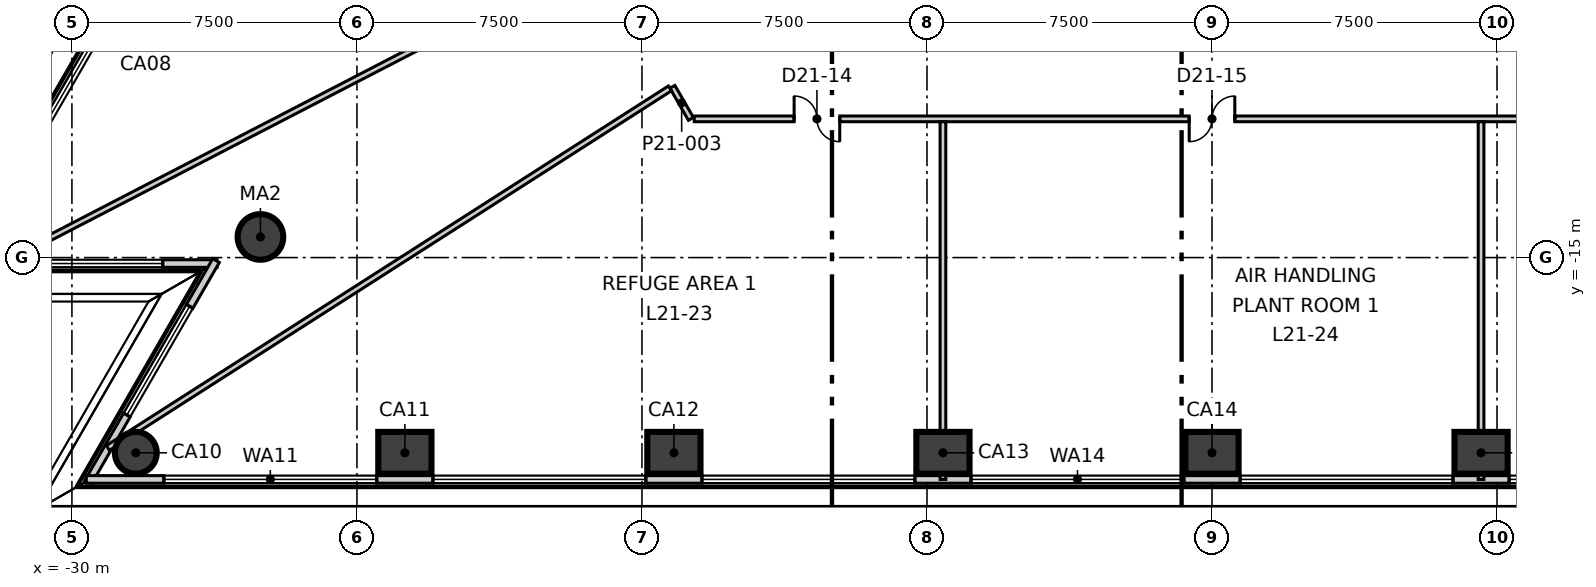
"""IFC4 building model, lengths in metres.
Left out: names, types, materials, properties, quantities, classifications, styles, units other than length and angle.
Written with IfcOpenShell. Run it as: python <this file> out.ifc"""

import sys

from ifc_helpers import new_model, si_unit, direction, frame, frame_2d, origin, origin_2d, place, context, subcontext, project, spatial, rectangle, circle, extrude, element, fill, save


model = new_model("IFC4")
c1 = context("Model", 3, precision=1e-05, world=origin(), true_north=direction((0.0, 1.0)))
c2 = subcontext(c1, "Body", "Model", "MODEL_VIEW")
j1 = project(units=[si_unit("LENGTHUNIT", "METRE"), si_unit("PLANEANGLEUNIT", "RADIAN")], contexts=[c1])
p1 = place(None, origin())
s1 = spatial("IfcSite", under=j1, at=p1, CompositionType="ELEMENT")
p2 = place(p1, origin())
s2 = spatial("IfcBuilding", under=s1, at=p2, CompositionType="ELEMENT")
p3 = place(p2, frame((0.0, 0.0, 95.3)))
s3 = spatial("IfcBuildingStorey", under=s2, at=p3, CompositionType="ELEMENT", Elevation=95.3)
p4 = place(p3, frame((-28.319, -20.137, -0.3), z_axis=(0.0, 0.0, 1.0), x_axis=(1.0, 0.0, 0.0)))
e1 = element("IfcColumn", 1, at=p4, inside=s3, PredefinedType="COLUMN", context=c2, shape_type="SweptSolid", body=[
    extrude(circle(Radius=0.55, at=origin_2d()), origin(), (0.0, 0.0, 1.0), 4.2),
])
for number, where, z_axis, x_axis in (
    (2, (-21.239, -20.137, -0.3), (0.0, 0.0, 1.0), (1.0, 0.0, 0.0)),
    (3, (-14.16, -20.137, -0.3), (0.0, 0.0, 1.0), (1.0, 0.0, 0.0)),
    (4, (-7.08, -20.137, -0.3), (0.0, 0.0, 1.0), (1.0, 0.0, 0.0)),
    (5, (0.0, -20.137, -0.3), (0.0, 0.0, 1.0), (1.0, 0.0, 0.0)),
    (6, (7.08, -20.137, -0.3), (0.0, 0.0, 1.0), (1.0, 0.0, 0.0)),
):
    element("IfcColumn", number, at=place(p3, frame(where, z_axis=z_axis, x_axis=x_axis)), inside=s3, PredefinedType="COLUMN", context=c2, shape_type="SweptSolid", body=[
        extrude(rectangle(XDim=1.4, YDim=1.1, at=origin_2d()), origin(), (0.0, 0.0, 1.0), 4.2),
    ])
p5 = place(p3, frame((-25.04, -14.457, -0.3), z_axis=(0.0, 0.0, 1.0), x_axis=(1.0, 0.0, 0.0)))
e7 = element("IfcColumn", 7, at=p5, inside=s3, PredefinedType="COLUMN", context=c2, shape_type="SweptSolid", body=[
    extrude(circle(Radius=0.6, at=origin_2d()), origin(), (0.0, 0.0, 1.0), 4.2),
])
p6 = place(p3, frame((-3.234, 36.072, 0.0), z_axis=(0.0, 0.0, 1.0), x_axis=(-0.500009108245, -0.866020145073, 0.0)))
e8 = element("IfcWall", 8, at=p6, inside=s3, PredefinedType="ELEMENTEDWALL", context=c2, shape_type="SweptSolid", body=[
    extrude(rectangle(XDim=59.225, YDim=0.2, at=frame_2d((29.613, 0.0))), origin(), (0.0, 0.0, 1.0), 3.9),
])
p7 = place(p6, frame((2.042, 0.0, 0.9)))
e9 = element("IfcOpeningElement", 9, at=p7, cuts=e8, PredefinedType="OPENING", context=c2, shape_type="SweptSolid", body=[
    extrude(rectangle(XDim=5.6, YDim=2.5, at=frame_2d((2.8, 1.25))), frame((0.0, 0.11, 0.0), z_axis=(0.0, -1.0, 0.0), x_axis=(1.0, 0.0, 0.0)), (0.0, 0.0, 1.0), 0.22),
])
p8 = place(p6, frame((9.122, 0.0, 0.9)))
e10 = element("IfcOpeningElement", 10, at=p8, cuts=e8, PredefinedType="OPENING", context=c2, shape_type="SweptSolid", body=[
    extrude(rectangle(XDim=5.6, YDim=2.5, at=frame_2d((2.8, 1.25))), frame((0.0, 0.11, 0.0), z_axis=(0.0, -1.0, 0.0), x_axis=(1.0, 0.0, 0.0)), (0.0, 0.0, 1.0), 0.22),
])
p9 = place(p6, frame((16.202, 0.0, 0.9)))
e11 = element("IfcOpeningElement", 11, at=p9, cuts=e8, PredefinedType="OPENING", context=c2, shape_type="SweptSolid", body=[
    extrude(rectangle(XDim=5.6, YDim=2.5, at=frame_2d((2.8, 1.25))), frame((0.0, 0.11, 0.0), z_axis=(0.0, -1.0, 0.0), x_axis=(1.0, 0.0, 0.0)), (0.0, 0.0, 1.0), 0.22),
])
p10 = place(p6, frame((23.282, 0.0, 0.9)))
e12 = element("IfcOpeningElement", 12, at=p10, cuts=e8, PredefinedType="OPENING", context=c2, shape_type="SweptSolid", body=[
    extrude(rectangle(XDim=5.6, YDim=2.5, at=frame_2d((2.8, 1.25))), frame((0.0, 0.11, 0.0), z_axis=(0.0, -1.0, 0.0), x_axis=(1.0, 0.0, 0.0)), (0.0, 0.0, 1.0), 0.22),
])
p11 = place(p6, frame((30.362, 0.0, 0.9)))
e13 = element("IfcOpeningElement", 13, at=p11, cuts=e8, PredefinedType="OPENING", context=c2, shape_type="SweptSolid", body=[
    extrude(rectangle(XDim=5.6, YDim=2.5, at=frame_2d((2.8, 1.25))), frame((0.0, 0.11, 0.0), z_axis=(0.0, -1.0, 0.0), x_axis=(1.0, 0.0, 0.0)), (0.0, 0.0, 1.0), 0.22),
])
p12 = place(p6, frame((37.442, 0.0, 0.9)))
e14 = element("IfcOpeningElement", 14, at=p12, cuts=e8, PredefinedType="OPENING", context=c2, shape_type="SweptSolid", body=[
    extrude(rectangle(XDim=5.6, YDim=2.5, at=frame_2d((2.8, 1.25))), frame((0.0, 0.11, 0.0), z_axis=(0.0, -1.0, 0.0), x_axis=(1.0, 0.0, 0.0)), (0.0, 0.0, 1.0), 0.22),
])
p13 = place(p6, frame((44.522, 0.0, 0.9)))
e15 = element("IfcOpeningElement", 15, at=p13, cuts=e8, PredefinedType="OPENING", context=c2, shape_type="SweptSolid", body=[
    extrude(rectangle(XDim=5.6, YDim=2.5, at=frame_2d((2.8, 1.25))), frame((0.0, 0.11, 0.0), z_axis=(0.0, -1.0, 0.0), x_axis=(1.0, 0.0, 0.0)), (0.0, 0.0, 1.0), 0.22),
])
p14 = place(p6, frame((51.602, 0.0, 0.9)))
e16 = element("IfcOpeningElement", 16, at=p14, cuts=e8, PredefinedType="OPENING", context=c2, shape_type="SweptSolid", body=[
    extrude(rectangle(XDim=5.6, YDim=2.5, at=frame_2d((2.8, 1.25))), frame((0.0, 0.11, 0.0), z_axis=(0.0, -1.0, 0.0), x_axis=(1.0, 0.0, 0.0)), (0.0, 0.0, 1.0), 0.22),
])
p15 = place(p3, frame((-32.902, -15.157, 0.0), z_axis=(0.0, 0.0, 1.0), x_axis=(1.0, 0.0, 0.0)))
e17 = element("IfcWall", 17, at=p15, inside=s3, PredefinedType="ELEMENTEDWALL", context=c2, shape_type="SweptSolid", body=[
    extrude(rectangle(XDim=6.719, YDim=0.2, at=frame_2d((3.359, 0.0))), origin(), (0.0, 0.0, 1.0), 3.9),
])
p16 = place(p15, frame((1.99, 0.0, 0.9)))
e18 = element("IfcOpeningElement", 18, at=p16, cuts=e17, PredefinedType="OPENING", context=c2, shape_type="SweptSolid", body=[
    extrude(rectangle(XDim=3.3, YDim=2.5, at=frame_2d((1.65, 1.25))), frame((0.0, 0.11, 0.0), z_axis=(0.0, -1.0, 0.0), x_axis=(1.0, 0.0, 0.0)), (0.0, 0.0, 1.0), 0.22),
])
p17 = place(p3, frame((-26.208, -15.079, 0.0), z_axis=(0.0, 0.0, 1.0), x_axis=(-0.49993005842, -0.866065780809, 0.0)))
e19 = element("IfcWall", 19, at=p17, inside=s3, PredefinedType="ELEMENTEDWALL", context=c2, shape_type="SweptSolid", body=[
    extrude(rectangle(XDim=6.719, YDim=0.2, at=frame_2d((3.359, 0.0))), origin(), (0.0, 0.0, 1.0), 3.9),
])
p18 = place(p17, frame((1.39, 0.0, 0.9)))
e20 = element("IfcOpeningElement", 20, at=p18, cuts=e19, PredefinedType="OPENING", context=c2, shape_type="SweptSolid", body=[
    extrude(rectangle(XDim=3.3, YDim=2.5, at=frame_2d((1.65, 1.25))), frame((0.0, 0.11, 0.0), z_axis=(0.0, -1.0, 0.0), x_axis=(1.0, 0.0, 0.0)), (0.0, 0.0, 1.0), 0.22),
])
p19 = place(p3, frame((-29.622, -20.837, 0.0), z_axis=(0.0, 0.0, 1.0), x_axis=(1.0, 0.0, 0.0)))
e21 = element("IfcWall", 21, at=p19, inside=s3, PredefinedType="ELEMENTEDWALL", context=c2, shape_type="SweptSolid", body=[
    extrude(rectangle(XDim=59.224, YDim=0.2, at=frame_2d((29.612, 0.0))), origin(), (0.0, 0.0, 1.0), 3.9),
])
p20 = place(p19, frame((2.043, 0.0, 0.9)))
e22 = element("IfcOpeningElement", 22, at=p20, cuts=e21, PredefinedType="OPENING", context=c2, shape_type="SweptSolid", body=[
    extrude(rectangle(XDim=5.6, YDim=2.5, at=frame_2d((2.8, 1.25))), frame((0.0, 0.11, 0.0), z_axis=(0.0, -1.0, 0.0), x_axis=(1.0, 0.0, 0.0)), (0.0, 0.0, 1.0), 0.22),
])
p21 = place(p19, frame((9.123, 0.0, 0.9)))
e23 = element("IfcOpeningElement", 23, at=p21, cuts=e21, PredefinedType="OPENING", context=c2, shape_type="SweptSolid", body=[
    extrude(rectangle(XDim=5.6, YDim=2.5, at=frame_2d((2.8, 1.25))), frame((0.0, 0.11, 0.0), z_axis=(0.0, -1.0, 0.0), x_axis=(1.0, 0.0, 0.0)), (0.0, 0.0, 1.0), 0.22),
])
p22 = place(p19, frame((16.202, 0.0, 0.9)))
e24 = element("IfcOpeningElement", 24, at=p22, cuts=e21, PredefinedType="OPENING", context=c2, shape_type="SweptSolid", body=[
    extrude(rectangle(XDim=5.6, YDim=2.5, at=frame_2d((2.8, 1.25))), frame((0.0, 0.11, 0.0), z_axis=(0.0, -1.0, 0.0), x_axis=(1.0, 0.0, 0.0)), (0.0, 0.0, 1.0), 0.22),
])
p23 = place(p19, frame((23.282, 0.0, 0.9)))
e25 = element("IfcOpeningElement", 25, at=p23, cuts=e21, PredefinedType="OPENING", context=c2, shape_type="SweptSolid", body=[
    extrude(rectangle(XDim=5.6, YDim=2.5, at=frame_2d((2.8, 1.25))), frame((0.0, 0.11, 0.0), z_axis=(0.0, -1.0, 0.0), x_axis=(1.0, 0.0, 0.0)), (0.0, 0.0, 1.0), 0.22),
])
p24 = place(p19, frame((30.362, 0.0, 0.9)))
e26 = element("IfcOpeningElement", 26, at=p24, cuts=e21, PredefinedType="OPENING", context=c2, shape_type="SweptSolid", body=[
    extrude(rectangle(XDim=5.6, YDim=2.5, at=frame_2d((2.8, 1.25))), frame((0.0, 0.11, 0.0), z_axis=(0.0, -1.0, 0.0), x_axis=(1.0, 0.0, 0.0)), (0.0, 0.0, 1.0), 0.22),
])
p25 = place(p19, frame((37.442, 0.0, 0.9)))
e27 = element("IfcOpeningElement", 27, at=p25, cuts=e21, PredefinedType="OPENING", context=c2, shape_type="SweptSolid", body=[
    extrude(rectangle(XDim=5.6, YDim=2.5, at=frame_2d((2.8, 1.25))), frame((0.0, 0.11, 0.0), z_axis=(0.0, -1.0, 0.0), x_axis=(1.0, 0.0, 0.0)), (0.0, 0.0, 1.0), 0.22),
])
p26 = place(p19, frame((44.521, 0.0, 0.9)))
e28 = element("IfcOpeningElement", 28, at=p26, cuts=e21, PredefinedType="OPENING", context=c2, shape_type="SweptSolid", body=[
    extrude(rectangle(XDim=5.6, YDim=2.5, at=frame_2d((2.8, 1.25))), frame((0.0, 0.11, 0.0), z_axis=(0.0, -1.0, 0.0), x_axis=(1.0, 0.0, 0.0)), (0.0, 0.0, 1.0), 0.22),
])
p27 = place(p19, frame((51.601, 0.0, 0.9)))
e29 = element("IfcOpeningElement", 29, at=p27, cuts=e21, PredefinedType="OPENING", context=c2, shape_type="SweptSolid", body=[
    extrude(rectangle(XDim=5.6, YDim=2.5, at=frame_2d((2.8, 1.25))), frame((0.0, 0.11, 0.0), z_axis=(0.0, -1.0, 0.0), x_axis=(1.0, 0.0, 0.0)), (0.0, 0.0, 1.0), 0.22),
])
p28 = place(p3, frame((32.857, -15.235, 0.0), z_axis=(0.0, 0.0, 1.0), x_axis=(-0.500009108245, 0.866020145073, 0.0)))
e30 = element("IfcWall", 30, at=p28, inside=s3, PredefinedType="ELEMENTEDWALL", context=c2, shape_type="SweptSolid", body=[
    extrude(rectangle(XDim=59.225, YDim=0.2, at=frame_2d((29.613, 0.0))), origin(), (0.0, 0.0, 1.0), 3.9),
])
p29 = place(p28, frame((2.043, 0.0, 0.9)))
e31 = element("IfcOpeningElement", 31, at=p29, cuts=e30, PredefinedType="OPENING", context=c2, shape_type="SweptSolid", body=[
    extrude(rectangle(XDim=5.6, YDim=2.5, at=frame_2d((2.8, 1.25))), frame((0.0, 0.11, 0.0), z_axis=(0.0, -1.0, 0.0), x_axis=(1.0, 0.0, 0.0)), (0.0, 0.0, 1.0), 0.22),
])
p30 = place(p28, frame((9.123, 0.0, 0.9)))
e32 = element("IfcOpeningElement", 32, at=p30, cuts=e30, PredefinedType="OPENING", context=c2, shape_type="SweptSolid", body=[
    extrude(rectangle(XDim=5.6, YDim=2.5, at=frame_2d((2.8, 1.25))), frame((0.0, 0.11, 0.0), z_axis=(0.0, -1.0, 0.0), x_axis=(1.0, 0.0, 0.0)), (0.0, 0.0, 1.0), 0.22),
])
p31 = place(p28, frame((16.203, 0.0, 0.9)))
e33 = element("IfcOpeningElement", 33, at=p31, cuts=e30, PredefinedType="OPENING", context=c2, shape_type="SweptSolid", body=[
    extrude(rectangle(XDim=5.6, YDim=2.5, at=frame_2d((2.8, 1.25))), frame((0.0, 0.11, 0.0), z_axis=(0.0, -1.0, 0.0), x_axis=(1.0, 0.0, 0.0)), (0.0, 0.0, 1.0), 0.22),
])
p32 = place(p28, frame((23.282, 0.0, 0.9)))
e34 = element("IfcOpeningElement", 34, at=p32, cuts=e30, PredefinedType="OPENING", context=c2, shape_type="SweptSolid", body=[
    extrude(rectangle(XDim=5.6, YDim=2.5, at=frame_2d((2.8, 1.25))), frame((0.0, 0.11, 0.0), z_axis=(0.0, -1.0, 0.0), x_axis=(1.0, 0.0, 0.0)), (0.0, 0.0, 1.0), 0.22),
])
p33 = place(p28, frame((30.362, 0.0, 0.9)))
e35 = element("IfcOpeningElement", 35, at=p33, cuts=e30, PredefinedType="OPENING", context=c2, shape_type="SweptSolid", body=[
    extrude(rectangle(XDim=5.6, YDim=2.5, at=frame_2d((2.8, 1.25))), frame((0.0, 0.11, 0.0), z_axis=(0.0, -1.0, 0.0), x_axis=(1.0, 0.0, 0.0)), (0.0, 0.0, 1.0), 0.22),
])
p34 = place(p28, frame((37.442, 0.0, 0.9)))
e36 = element("IfcOpeningElement", 36, at=p34, cuts=e30, PredefinedType="OPENING", context=c2, shape_type="SweptSolid", body=[
    extrude(rectangle(XDim=5.6, YDim=2.5, at=frame_2d((2.8, 1.25))), frame((0.0, 0.11, 0.0), z_axis=(0.0, -1.0, 0.0), x_axis=(1.0, 0.0, 0.0)), (0.0, 0.0, 1.0), 0.22),
])
p35 = place(p28, frame((44.522, 0.0, 0.9)))
e37 = element("IfcOpeningElement", 37, at=p35, cuts=e30, PredefinedType="OPENING", context=c2, shape_type="SweptSolid", body=[
    extrude(rectangle(XDim=5.6, YDim=2.5, at=frame_2d((2.8, 1.25))), frame((0.0, 0.11, 0.0), z_axis=(0.0, -1.0, 0.0), x_axis=(1.0, 0.0, 0.0)), (0.0, 0.0, 1.0), 0.22),
])
p36 = place(p28, frame((51.602, 0.0, 0.9)))
e38 = element("IfcOpeningElement", 38, at=p36, cuts=e30, PredefinedType="OPENING", context=c2, shape_type="SweptSolid", body=[
    extrude(rectangle(XDim=5.6, YDim=2.5, at=frame_2d((2.8, 1.25))), frame((0.0, 0.11, 0.0), z_axis=(0.0, -1.0, 0.0), x_axis=(1.0, 0.0, 0.0)), (0.0, 0.0, 1.0), 0.22),
])
p37 = place(p3, frame((-14.199, -10.507, 0.0), z_axis=(0.0, 0.0, 1.0), x_axis=(0.500265064493, -0.865872314633, 0.0)))
e39 = element("IfcWall", 39, at=p37, inside=s3, PredefinedType="PARTITIONING", context=c2, shape_type="SweptSolid", body=[
    extrude(rectangle(XDim=0.974, YDim=0.15, at=frame_2d((0.487, 0.0))), origin(), (0.0, 0.0, 1.0), 3.9),
])
p38 = place(p3, frame((-31.887, -15.157, 0.0), z_axis=(0.0, 0.0, 1.0), x_axis=(0.88806151424, 0.459724642503, 0.0)))
e40 = element("IfcWall", 40, at=p38, inside=s3, PredefinedType="PARTITIONING", context=c2, shape_type="SweptSolid", body=[
    extrude(rectangle(XDim=17.586, YDim=0.15, at=frame_2d((8.793, 0.0))), origin(), (0.0, 0.0, 1.0), 3.1),
])
p39 = place(p3, frame((-29.054, -20.01, 0.0), z_axis=(0.0, 0.0, 1.0), x_axis=(0.842374405573, 0.53889271737, 0.0)))
e41 = element("IfcWall", 41, at=p39, inside=s3, PredefinedType="PARTITIONING", context=c2, shape_type="SweptSolid", body=[
    extrude(rectangle(XDim=17.56, YDim=0.15, at=frame_2d((8.78, 0.0))), origin(), (0.0, 0.0, 1.0), 3.1),
])
p40 = place(p3, frame((-13.625, -11.35, 0.0), z_axis=(0.0, 0.0, 1.0), x_axis=(1.0, 0.0, 0.0)))
e42 = element("IfcWall", 42, at=p40, inside=s3, PredefinedType="PARTITIONING", context=c2, shape_type="SweptSolid", body=[
    extrude(rectangle(XDim=27.337, YDim=0.15, at=frame_2d((13.668, 0.0))), origin(), (0.0, 0.0, 1.0), 3.9),
])
p41 = place(p40, frame((2.629, 0.0, 0.0)))
e43 = element("IfcOpeningElement", 43, at=p41, cuts=e42, PredefinedType="OPENING", context=c2, shape_type="SweptSolid", body=[
    extrude(rectangle(XDim=1.2, YDim=2.1, at=frame_2d((0.6, 1.05))), frame((0.0, 0.085, 0.0), z_axis=(0.0, -1.0, 0.0), x_axis=(1.0, 0.0, 0.0)), (0.0, 0.0, 1.0), 0.17),
])
p42 = place(p40, frame((13.025, 0.0, 0.0)))
e44 = element("IfcOpeningElement", 44, at=p42, cuts=e42, PredefinedType="OPENING", context=c2, shape_type="SweptSolid", body=[
    extrude(rectangle(XDim=1.2, YDim=2.1, at=frame_2d((0.6, 1.05))), frame((0.0, 0.085, 0.0), z_axis=(0.0, -1.0, 0.0), x_axis=(1.0, 0.0, 0.0)), (0.0, 0.0, 1.0), 0.17),
])
p43 = place(p40, frame((23.421, 0.0, 0.0)))
e45 = element("IfcOpeningElement", 45, at=p43, cuts=e42, PredefinedType="OPENING", context=c2, shape_type="SweptSolid", body=[
    extrude(rectangle(XDim=1.2, YDim=2.1, at=frame_2d((0.6, 1.05))), frame((0.0, 0.085, 0.0), z_axis=(0.0, -1.0, 0.0), x_axis=(1.0, 0.0, 0.0)), (0.0, 0.0, 1.0), 0.17),
])
for number, where, z_axis, x_axis in (
    (46, (-7.08, -20.837, 0.0), (0.0, 0.0, 1.0), (0.0, 1.0, 0.0)),
    (47, (7.08, -20.837, 0.0), (0.0, 0.0, 1.0), (0.0, 1.0, 0.0)),
):
    element("IfcWall", number, at=place(p3, frame(where, z_axis=z_axis, x_axis=x_axis)), inside=s3, PredefinedType="PARTITIONING", context=c2, shape_type="SweptSolid", body=[
        extrude(rectangle(XDim=9.412, YDim=0.15, at=frame_2d((4.706, 0.0))), origin(), (0.0, 0.0, 1.0), 3.9),
    ])
p44 = place(p14, origin())
e48 = element("IfcWindow", 48, at=p44, inside=s3, PartitioningType="SINGLE_PANEL", PredefinedType="WINDOW", context=c2, shape_type="SweptSolid", body=[
    extrude(rectangle(XDim=5.6, YDim=2.5, at=frame_2d((2.8, 1.25))), frame((0.0, 0.03, 0.0), z_axis=(0.0, -1.0, 0.0), x_axis=(1.0, 0.0, 0.0)), (0.0, 0.0, 1.0), 0.06),
])
fill(e16, e48)
p45 = place(p16, origin())
e49 = element("IfcWindow", 49, at=p45, inside=s3, PartitioningType="SINGLE_PANEL", PredefinedType="WINDOW", context=c2, shape_type="SweptSolid", body=[
    extrude(rectangle(XDim=3.3, YDim=2.5, at=frame_2d((1.65, 1.25))), frame((0.0, 0.03, 0.0), z_axis=(0.0, -1.0, 0.0), x_axis=(1.0, 0.0, 0.0)), (0.0, 0.0, 1.0), 0.06),
])
fill(e18, e49)
p46 = place(p18, origin())
e50 = element("IfcWindow", 50, at=p46, inside=s3, PartitioningType="SINGLE_PANEL", PredefinedType="WINDOW", context=c2, shape_type="SweptSolid", body=[
    extrude(rectangle(XDim=3.3, YDim=2.5, at=frame_2d((1.65, 1.25))), frame((0.0, 0.03, 0.0), z_axis=(0.0, -1.0, 0.0), x_axis=(1.0, 0.0, 0.0)), (0.0, 0.0, 1.0), 0.06),
])
fill(e20, e50)
p47 = place(p20, origin())
e51 = element("IfcWindow", 51, at=p47, inside=s3, PartitioningType="SINGLE_PANEL", PredefinedType="WINDOW", context=c2, shape_type="SweptSolid", body=[
    extrude(rectangle(XDim=5.6, YDim=2.5, at=frame_2d((2.8, 1.25))), frame((0.0, 0.03, 0.0), z_axis=(0.0, -1.0, 0.0), x_axis=(1.0, 0.0, 0.0)), (0.0, 0.0, 1.0), 0.06),
])
fill(e22, e51)
p48 = place(p21, origin())
e52 = element("IfcWindow", 52, at=p48, inside=s3, PartitioningType="SINGLE_PANEL", PredefinedType="WINDOW", context=c2, shape_type="SweptSolid", body=[
    extrude(rectangle(XDim=5.6, YDim=2.5, at=frame_2d((2.8, 1.25))), frame((0.0, 0.03, 0.0), z_axis=(0.0, -1.0, 0.0), x_axis=(1.0, 0.0, 0.0)), (0.0, 0.0, 1.0), 0.06),
])
fill(e23, e52)
p49 = place(p22, origin())
e53 = element("IfcWindow", 53, at=p49, inside=s3, PartitioningType="SINGLE_PANEL", PredefinedType="WINDOW", context=c2, shape_type="SweptSolid", body=[
    extrude(rectangle(XDim=5.6, YDim=2.5, at=frame_2d((2.8, 1.25))), frame((0.0, 0.03, 0.0), z_axis=(0.0, -1.0, 0.0), x_axis=(1.0, 0.0, 0.0)), (0.0, 0.0, 1.0), 0.06),
])
fill(e24, e53)
p50 = place(p23, origin())
e54 = element("IfcWindow", 54, at=p50, inside=s3, PartitioningType="SINGLE_PANEL", PredefinedType="WINDOW", context=c2, shape_type="SweptSolid", body=[
    extrude(rectangle(XDim=5.6, YDim=2.5, at=frame_2d((2.8, 1.25))), frame((0.0, 0.03, 0.0), z_axis=(0.0, -1.0, 0.0), x_axis=(1.0, 0.0, 0.0)), (0.0, 0.0, 1.0), 0.06),
])
fill(e25, e54)
p51 = place(p24, origin())
e55 = element("IfcWindow", 55, at=p51, inside=s3, PartitioningType="SINGLE_PANEL", PredefinedType="WINDOW", context=c2, shape_type="SweptSolid", body=[
    extrude(rectangle(XDim=5.6, YDim=2.5, at=frame_2d((2.8, 1.25))), frame((0.0, 0.03, 0.0), z_axis=(0.0, -1.0, 0.0), x_axis=(1.0, 0.0, 0.0)), (0.0, 0.0, 1.0), 0.06),
])
fill(e26, e55)
p52 = place(p25, origin())
e56 = element("IfcWindow", 56, at=p52, inside=s3, PartitioningType="SINGLE_PANEL", PredefinedType="WINDOW", context=c2, shape_type="SweptSolid", body=[
    extrude(rectangle(XDim=5.6, YDim=2.5, at=frame_2d((2.8, 1.25))), frame((0.0, 0.03, 0.0), z_axis=(0.0, -1.0, 0.0), x_axis=(1.0, 0.0, 0.0)), (0.0, 0.0, 1.0), 0.06),
])
fill(e27, e56)
p53 = place(p41, origin())
e57 = element("IfcDoor", 57, at=p53, inside=s3, OperationType="DOUBLE_DOOR_SINGLE_SWING", PredefinedType="DOOR", context=c2, shape_type="SweptSolid", body=[
    extrude(rectangle(XDim=1.2, YDim=2.1, at=frame_2d((0.6, 1.05))), frame((0.0, 0.025, 0.0), z_axis=(0.0, -1.0, 0.0), x_axis=(1.0, 0.0, 0.0)), (0.0, 0.0, 1.0), 0.05),
])
fill(e43, e57)
p54 = place(p42, origin())
e58 = element("IfcDoor", 58, at=p54, inside=s3, OperationType="DOUBLE_DOOR_SINGLE_SWING", PredefinedType="DOOR", context=c2, shape_type="SweptSolid", body=[
    extrude(rectangle(XDim=1.2, YDim=2.1, at=frame_2d((0.6, 1.05))), frame((0.0, 0.025, 0.0), z_axis=(0.0, -1.0, 0.0), x_axis=(1.0, 0.0, 0.0)), (0.0, 0.0, 1.0), 0.05),
])
fill(e44, e58)
save(model, sys.argv[1])
